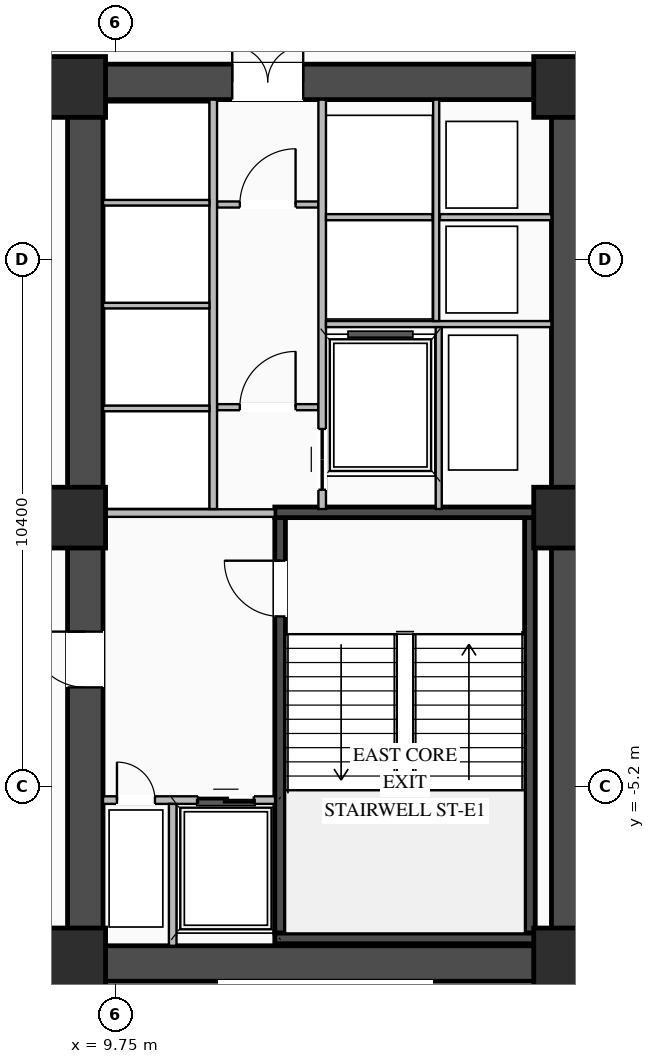
"""IFC4 building model, lengths in metres.
Left out: names, types, materials, properties, quantities, classifications, styles, units other than length and angle.
Written with IfcOpenShell. Run it as: python <this file> out.ifc"""

import sys

from ifc_helpers import new_model, si_unit, direction, frame, frame_2d, origin, origin_2d, place, context, subcontext, project, spatial, rectangle, extrude, element, fill, save


model = new_model("IFC4")
c1 = context("Model", 3, precision=1e-05, world=origin(), true_north=direction((0.0, 1.0)))
c2 = subcontext(c1, "Body", "Model", "MODEL_VIEW")
j1 = project(units=[si_unit("LENGTHUNIT", "METRE"), si_unit("PLANEANGLEUNIT", "RADIAN")], contexts=[c1])
p1 = place(None, origin())
s1 = spatial("IfcSite", under=j1, at=p1, CompositionType="ELEMENT")
p2 = place(p1, origin())
s2 = spatial("IfcBuilding", under=s1, at=p2, CompositionType="ELEMENT")
p3 = place(p2, frame((0.0, 0.0, 22.8)))
s3 = spatial("IfcBuildingStorey", under=s2, at=p3, CompositionType="ELEMENT", Elevation=22.8)
p4 = place(p3, frame((8.8, -8.7, 0.0), z_axis=(0.0, 0.0, 1.0), x_axis=(1.0, 0.0, 0.0)))
e1 = element("IfcWall", 1, at=p4, inside=s3, PredefinedType="SHEAR", context=c2, shape_type="SweptSolid", body=[
    extrude(rectangle(XDim=10.25, YDim=0.7, at=frame_2d((5.125, 0.0))), origin(), (0.0, 0.0, 1.0), 3.92),
])
p5 = place(p3, frame((8.8, 8.7, 0.0), z_axis=(0.0, 0.0, 1.0), x_axis=(1.0, 0.0, 0.0)))
e2 = element("IfcWall", 2, at=p5, inside=s3, PredefinedType="SHEAR", context=c2, shape_type="SweptSolid", body=[
    extrude(rectangle(XDim=10.25, YDim=0.7, at=frame_2d((5.125, 0.0))), origin(), (0.0, 0.0, 1.0), 3.92),
])
p6 = place(p5, frame((3.25, 0.0, 0.0)))
e3 = element("IfcOpeningElement", 3, at=p6, cuts=e2, PredefinedType="OPENING", context=c2, shape_type="SweptSolid", body=[
    extrude(rectangle(XDim=1.4, YDim=2.05, at=frame_2d((0.7, 1.025))), frame((0.0, 0.36, 0.0), z_axis=(0.0, -1.0, 0.0), x_axis=(1.0, 0.0, 0.0)), (0.0, 0.0, 1.0), 0.72),
])
p7 = place(p3, frame((9.15, -8.35, 0.0), z_axis=(0.0, 0.0, 1.0), x_axis=(0.0, 1.0, 0.0)))
e4 = element("IfcWall", 4, at=p7, inside=s3, PredefinedType="SHEAR", context=c2, shape_type="SweptSolid", body=[
    extrude(rectangle(XDim=16.7, YDim=0.7, at=frame_2d((8.35, 0.0))), origin(), (0.0, 0.0, 1.0), 3.92),
])
p8 = place(p7, frame((5.1, 0.0, 0.0)))
e5 = element("IfcOpeningElement", 5, at=p8, cuts=e4, PredefinedType="OPENING", context=c2, shape_type="SweptSolid", body=[
    extrude(rectangle(XDim=1.1, YDim=2.08, at=frame_2d((0.55, 1.04))), frame((0.0, 0.36, 0.0), z_axis=(0.0, -1.0, 0.0), x_axis=(1.0, 0.0, 0.0)), (0.0, 0.0, 1.0), 0.72),
])
p9 = place(p3, frame((18.7, -8.35, 0.0), z_axis=(0.0, 0.0, 1.0), x_axis=(0.0, 1.0, 0.0)))
e6 = element("IfcWall", 6, at=p9, inside=s3, PredefinedType="SHEAR", context=c2, shape_type="SweptSolid", body=[
    extrude(rectangle(XDim=16.7, YDim=0.7, at=frame_2d((8.35, 0.0))), origin(), (0.0, 0.0, 1.0), 3.92),
])
p10 = place(p3, frame((12.995, -8.1, 0.0), z_axis=(0.0, 0.0, 1.0), x_axis=(0.0, 1.0, 0.0)))
e7 = element("IfcWall", 7, at=p10, inside=s3, PredefinedType="SHEAR", context=c2, shape_type="SweptSolid", body=[
    extrude(rectangle(XDim=8.2, YDim=0.21, at=frame_2d((4.1, 0.0))), origin(), (0.0, 0.0, 1.0), 3.92),
])
p11 = place(p10, frame((6.25, 0.0, 0.0)))
e8 = element("IfcOpeningElement", 8, at=p11, cuts=e7, PredefinedType="OPENING", context=c2, shape_type="SweptSolid", body=[
    extrude(rectangle(XDim=1.1, YDim=2.15, at=frame_2d((0.55, 1.075))), frame((0.0, 0.115, 0.0), z_axis=(0.0, -1.0, 0.0), x_axis=(1.0, 0.0, 0.0)), (0.0, 0.0, 1.0), 0.23),
])
p12 = place(p3, frame((17.925, -8.1, 0.0), z_axis=(0.0, 0.0, 1.0), x_axis=(0.0, 1.0, 0.0)))
e9 = element("IfcWall", 9, at=p12, inside=s3, PredefinedType="SHEAR", context=c2, shape_type="SweptSolid", body=[
    extrude(rectangle(XDim=8.2, YDim=0.21, at=frame_2d((4.1, 0.0))), origin(), (0.0, 0.0, 1.0), 3.92),
])
for number, where, z_axis, x_axis in (
    (10, (12.89, -8.205, 0.0), (0.0, 0.0, 1.0), (1.0, 0.0, 0.0)),
    (11, (18.03, 0.205, 0.0), (0.0, 0.0, 1.0), (-1.0, 0.0, 0.0)),
):
    element("IfcWall", number, at=place(p3, frame(where, z_axis=z_axis, x_axis=x_axis)), inside=s3, PredefinedType="SHEAR", context=c2, shape_type="SweptSolid", body=[
        extrude(rectangle(XDim=5.14, YDim=0.21, at=frame_2d((2.57, 0.0))), origin(), (0.0, 0.0, 1.0), 3.92),
    ])
for number, where, z_axis, x_axis in (
    (12, (8.95, -8.6, 0.0), (0.0, 0.0, 1.0), (1.0, 0.0, 0.0)),
    (13, (8.95, 0.1, 0.0), (0.0, 0.0, 1.0), (1.0, 0.0, 0.0)),
    (14, (8.95, 8.6, 0.0), (0.0, 0.0, 1.0), (1.0, 0.0, 0.0)),
    (15, (18.6, -8.6, 0.0), (0.0, 0.0, 1.0), (1.0, 0.0, 0.0)),
    (16, (18.6, 0.1, 0.0), (0.0, 0.0, 1.0), (1.0, 0.0, 0.0)),
    (17, (18.6, 8.6, 0.0), (0.0, 0.0, 1.0), (1.0, 0.0, 0.0)),
):
    element("IfcColumn", number, at=place(p3, frame(where, z_axis=z_axis, x_axis=x_axis)), inside=s3, PredefinedType="COLUMN", context=c2, shape_type="SweptSolid", body=[
        extrude(rectangle(XDim=1.2, YDim=1.2, at=origin_2d()), origin(), (0.0, 0.0, 1.0), 4.2),
    ])
p13 = place(p3, frame((9.5, -5.475, 0.0), z_axis=(0.0, 0.0, 1.0), x_axis=(1.0, 0.0, 0.0)))
e18 = element("IfcWall", 18, at=p13, inside=s3, PredefinedType="STANDARD", context=c2, shape_type="SweptSolid", body=[
    extrude(rectangle(XDim=3.395, YDim=0.15, at=frame_2d((1.698, 0.0))), origin(), (0.0, 0.0, 1.0), 3.9),
])
p14 = place(p13, frame((1.875, 0.0, 0.0)))
e19 = element("IfcOpeningElement", 19, at=p14, cuts=e18, PredefinedType="OPENING", context=c2, shape_type="SweptSolid", body=[
    extrude(rectangle(XDim=1.1, YDim=2.15, at=frame_2d((0.55, 1.075))), frame((0.0, 0.085, 0.0), z_axis=(0.0, -1.0, 0.0), x_axis=(1.0, 0.0, 0.0)), (0.0, 0.0, 1.0), 0.17),
])
p15 = place(p13, frame((0.275, 0.0, 0.0)))
e20 = element("IfcOpeningElement", 20, at=p15, cuts=e18, PredefinedType="OPENING", context=c2, shape_type="SweptSolid", body=[
    extrude(rectangle(XDim=0.75, YDim=2.05, at=frame_2d((0.375, 1.025))), frame((0.0, 0.085, 0.0), z_axis=(0.0, -1.0, 0.0), x_axis=(1.0, 0.0, 0.0)), (0.0, 0.0, 1.0), 0.17),
])
p16 = place(p3, frame((10.875, -8.35, 0.0), z_axis=(0.0, 0.0, 1.0), x_axis=(0.0, 1.0, 0.0)))
e21 = element("IfcWall", 21, at=p16, inside=s3, PredefinedType="STANDARD", context=c2, shape_type="SweptSolid", body=[
    extrude(rectangle(XDim=2.8, YDim=0.15, at=frame_2d((1.4, 0.0))), origin(), (0.0, 0.0, 1.0), 3.9),
])
p17 = place(p3, frame((9.5, 0.19, 0.0), z_axis=(0.0, 0.0, 1.0), x_axis=(1.0, 0.0, 0.0)))
e22 = element("IfcWall", 22, at=p17, inside=s3, PredefinedType="STANDARD", context=c2, shape_type="SweptSolid", body=[
    extrude(rectangle(XDim=3.39, YDim=0.15, at=frame_2d((1.695, 0.0))), origin(), (0.0, 0.0, 1.0), 3.295),
])
p18 = place(p3, frame((11.75, 2.28, 0.0), z_axis=(0.0, 0.0, 1.0), x_axis=(1.0, 0.0, 0.0)))
e23 = element("IfcWall", 23, at=p18, inside=s3, PredefinedType="STANDARD", context=c2, shape_type="SweptSolid", body=[
    extrude(rectangle(XDim=2.0, YDim=0.12, at=frame_2d((1.0, 0.0))), origin(), (0.0, 0.0, 1.0), 3.9),
])
p19 = place(p18, frame((0.45, 0.0, 0.0)))
e24 = element("IfcOpeningElement", 24, at=p19, cuts=e23, PredefinedType="OPENING", context=c2, shape_type="SweptSolid", body=[
    extrude(rectangle(XDim=1.1, YDim=2.1, at=frame_2d((0.55, 1.05))), frame((0.0, 0.07, 0.0), z_axis=(0.0, -1.0, 0.0), x_axis=(1.0, 0.0, 0.0)), (0.0, 0.0, 1.0), 0.14),
])
p20 = place(p3, frame((11.75, 6.28, 0.0), z_axis=(0.0, 0.0, 1.0), x_axis=(1.0, 0.0, 0.0)))
e25 = element("IfcWall", 25, at=p20, inside=s3, PredefinedType="STANDARD", context=c2, shape_type="SweptSolid", body=[
    extrude(rectangle(XDim=2.0, YDim=0.12, at=frame_2d((1.0, 0.0))), origin(), (0.0, 0.0, 1.0), 3.9),
])
p21 = place(p20, frame((0.45, 0.0, 0.0)))
e26 = element("IfcOpeningElement", 26, at=p21, cuts=e25, PredefinedType="OPENING", context=c2, shape_type="SweptSolid", body=[
    extrude(rectangle(XDim=1.1, YDim=2.1, at=frame_2d((0.55, 1.05))), frame((0.0, 0.07, 0.0), z_axis=(0.0, -1.0, 0.0), x_axis=(1.0, 0.0, 0.0)), (0.0, 0.0, 1.0), 0.14),
])
p22 = place(p3, frame((11.675, 0.27, 0.0), z_axis=(0.0, 0.0, 1.0), x_axis=(0.0, 1.0, 0.0)))
e27 = element("IfcWall", 27, at=p22, inside=s3, PredefinedType="STANDARD", context=c2, shape_type="SweptSolid", body=[
    extrude(rectangle(XDim=8.08, YDim=0.15, at=frame_2d((4.04, 0.0))), origin(), (0.0, 0.0, 1.0), 3.9),
])
for number, where, z_axis, x_axis in (
    (28, (9.5, 2.255, 0.0), (0.0, 0.0, 1.0), (1.0, 0.0, 0.0)),
    (29, (9.5, 4.285, 0.0), (0.0, 0.0, 1.0), (1.0, 0.0, 0.0)),
    (30, (9.5, 6.315, 0.0), (0.0, 0.0, 1.0), (1.0, 0.0, 0.0)),
):
    element("IfcWall", number, at=place(p3, frame(where, z_axis=z_axis, x_axis=x_axis)), inside=s3, PredefinedType="STANDARD", context=c2, shape_type="SweptSolid", body=[
        extrude(rectangle(XDim=2.1, YDim=0.11, at=frame_2d((1.05, 0.0))), origin(), (0.0, 0.0, 1.0), 3.9),
    ])
p23 = place(p3, frame((13.825, 0.27, 0.0), z_axis=(0.0, 0.0, 1.0), x_axis=(0.0, 1.0, 0.0)))
e31 = element("IfcWall", 31, at=p23, inside=s3, PredefinedType="STANDARD", context=c2, shape_type="SweptSolid", body=[
    extrude(rectangle(XDim=8.08, YDim=0.15, at=frame_2d((4.04, 0.0))), origin(), (0.0, 0.0, 1.0), 3.9),
])
p24 = place(p23, frame((0.38, 0.0, 0.0)))
e32 = element("IfcOpeningElement", 32, at=p24, cuts=e31, PredefinedType="OPENING", context=c2, shape_type="SweptSolid", body=[
    extrude(rectangle(XDim=1.2, YDim=2.1, at=frame_2d((0.6, 1.05))), frame((0.0, 0.085, 0.0), z_axis=(0.0, -1.0, 0.0), x_axis=(1.0, 0.0, 0.0)), (0.0, 0.0, 1.0), 0.17),
])
p25 = place(p3, frame((13.9, 3.92, 0.0), z_axis=(0.0, 0.0, 1.0), x_axis=(1.0, 0.0, 0.0)))
e33 = element("IfcWall", 33, at=p25, inside=s3, PredefinedType="STANDARD", context=c2, shape_type="SweptSolid", body=[
    extrude(rectangle(XDim=4.45, YDim=0.12, at=frame_2d((2.225, 0.0))), origin(), (0.0, 0.0, 1.0), 3.9),
])
p26 = place(p3, frame((16.15, 6.03, 0.0), z_axis=(0.0, 0.0, 1.0), x_axis=(1.0, 0.0, 0.0)))
e34 = element("IfcWall", 34, at=p26, inside=s3, PredefinedType="STANDARD", context=c2, shape_type="SweptSolid", body=[
    extrude(rectangle(XDim=2.2, YDim=0.12, at=frame_2d((1.1, 0.0))), origin(), (0.0, 0.0, 1.0), 3.9),
])
p27 = place(p3, frame((16.075, 3.98, 0.0), z_axis=(0.0, 0.0, 1.0), x_axis=(0.0, 1.0, 0.0)))
e35 = element("IfcWall", 35, at=p27, inside=s3, PredefinedType="STANDARD", context=c2, shape_type="SweptSolid", body=[
    extrude(rectangle(XDim=4.37, YDim=0.12, at=frame_2d((2.185, 0.0))), origin(), (0.0, 0.0, 1.0), 3.9),
])
p28 = place(p3, frame((13.9, 6.03, 0.0), z_axis=(0.0, 0.0, 1.0), x_axis=(1.0, 0.0, 0.0)))
e36 = element("IfcWall", 36, at=p28, inside=s3, PredefinedType="STANDARD", context=c2, shape_type="SweptSolid", body=[
    extrude(rectangle(XDim=2.1, YDim=0.12, at=frame_2d((1.05, 0.0))), origin(), (0.0, 0.0, 1.0), 3.9),
])
p29 = place(p3, frame((16.125, 0.27, 0.0), z_axis=(0.0, 0.0, 1.0), x_axis=(0.0, 1.0, 0.0)))
e37 = element("IfcWall", 37, at=p29, inside=s3, PredefinedType="STANDARD", context=c2, shape_type="SweptSolid", body=[
    extrude(rectangle(XDim=3.59, YDim=0.12, at=frame_2d((1.795, 0.0))), origin(), (0.0, 0.0, 1.0), 3.9),
])
p30 = place(p11, origin())
e38 = element("IfcDoor", 38, at=p30, inside=s3, OperationType="SINGLE_SWING_RIGHT", PredefinedType="DOOR", context=c2, shape_type="SweptSolid", body=[
    extrude(rectangle(XDim=1.1, YDim=2.15, at=frame_2d((0.55, 1.075))), frame((0.0, 0.025, 0.0), z_axis=(0.0, -1.0, 0.0), x_axis=(1.0, 0.0, 0.0)), (0.0, 0.0, 1.0), 0.05),
])
fill(e8, e38)
p31 = place(p14, origin())
e39 = element("IfcDoor", 39, at=p31, inside=s3, OperationType="DOUBLE_DOOR_SLIDING", PredefinedType="DOOR", context=c2, shape_type="SweptSolid", body=[
    extrude(rectangle(XDim=1.1, YDim=2.15, at=frame_2d((0.55, 1.075))), frame((0.0, 0.025, 0.0), z_axis=(0.0, -1.0, 0.0), x_axis=(1.0, 0.0, 0.0)), (0.0, 0.0, 1.0), 0.05),
])
fill(e19, e39)
p32 = place(p15, origin())
e40 = element("IfcDoor", 40, at=p32, inside=s3, OperationType="SINGLE_SWING_LEFT", PredefinedType="DOOR", context=c2, shape_type="SweptSolid", body=[
    extrude(rectangle(XDim=0.75, YDim=2.05, at=frame_2d((0.375, 1.025))), frame((0.0, 0.025, 0.0), z_axis=(0.0, -1.0, 0.0), x_axis=(1.0, 0.0, 0.0)), (0.0, 0.0, 1.0), 0.05),
])
fill(e20, e40)
p33 = place(p8, origin())
e41 = element("IfcDoor", 41, at=p33, inside=s3, OperationType="SINGLE_SWING_RIGHT", PredefinedType="DOOR", context=c2, shape_type="SweptSolid", body=[
    extrude(rectangle(XDim=1.1, YDim=2.08, at=frame_2d((0.55, 1.04))), frame((0.0, -0.255, 0.0), z_axis=(0.0, -1.0, 0.0), x_axis=(1.0, 0.0, 0.0)), (0.0, 0.0, 1.0), 0.05),
])
fill(e5, e41)
p34 = place(p19, origin())
e42 = element("IfcDoor", 42, at=p34, inside=s3, OperationType="SINGLE_SWING_RIGHT", PredefinedType="DOOR", context=c2, shape_type="SweptSolid", body=[
    extrude(rectangle(XDim=1.1, YDim=2.1, at=frame_2d((0.55, 1.05))), frame((0.0, 0.025, 0.0), z_axis=(0.0, -1.0, 0.0), x_axis=(1.0, 0.0, 0.0)), (0.0, 0.0, 1.0), 0.05),
])
fill(e24, e42)
p35 = place(p21, origin())
e43 = element("IfcDoor", 43, at=p35, inside=s3, OperationType="SINGLE_SWING_RIGHT", PredefinedType="DOOR", context=c2, shape_type="SweptSolid", body=[
    extrude(rectangle(XDim=1.1, YDim=2.1, at=frame_2d((0.55, 1.05))), frame((0.0, 0.025, 0.0), z_axis=(0.0, -1.0, 0.0), x_axis=(1.0, 0.0, 0.0)), (0.0, 0.0, 1.0), 0.05),
])
fill(e26, e43)
p36 = place(p6, origin())
e44 = element("IfcDoor", 44, at=p36, inside=s3, OperationType="DOUBLE_DOOR_SINGLE_SWING", PredefinedType="DOOR", context=c2, shape_type="SweptSolid", body=[
    extrude(rectangle(XDim=1.4, YDim=2.05, at=frame_2d((0.7, 1.025))), frame((0.0, 0.295, 0.0), z_axis=(0.0, -1.0, 0.0), x_axis=(1.0, 0.0, 0.0)), (0.0, 0.0, 1.0), 0.05),
])
fill(e3, e44)
p37 = place(p24, origin())
e45 = element("IfcDoor", 45, at=p37, inside=s3, OperationType="DOUBLE_DOOR_SLIDING", PredefinedType="DOOR", context=c2, shape_type="SweptSolid", body=[
    extrude(rectangle(XDim=1.2, YDim=2.1, at=frame_2d((0.6, 1.05))), frame((0.0, 0.025, 0.0), z_axis=(0.0, -1.0, 0.0), x_axis=(1.0, 0.0, 0.0)), (0.0, 0.0, 1.0), 0.05),
])
fill(e32, e45)
save(model, sys.argv[1])
